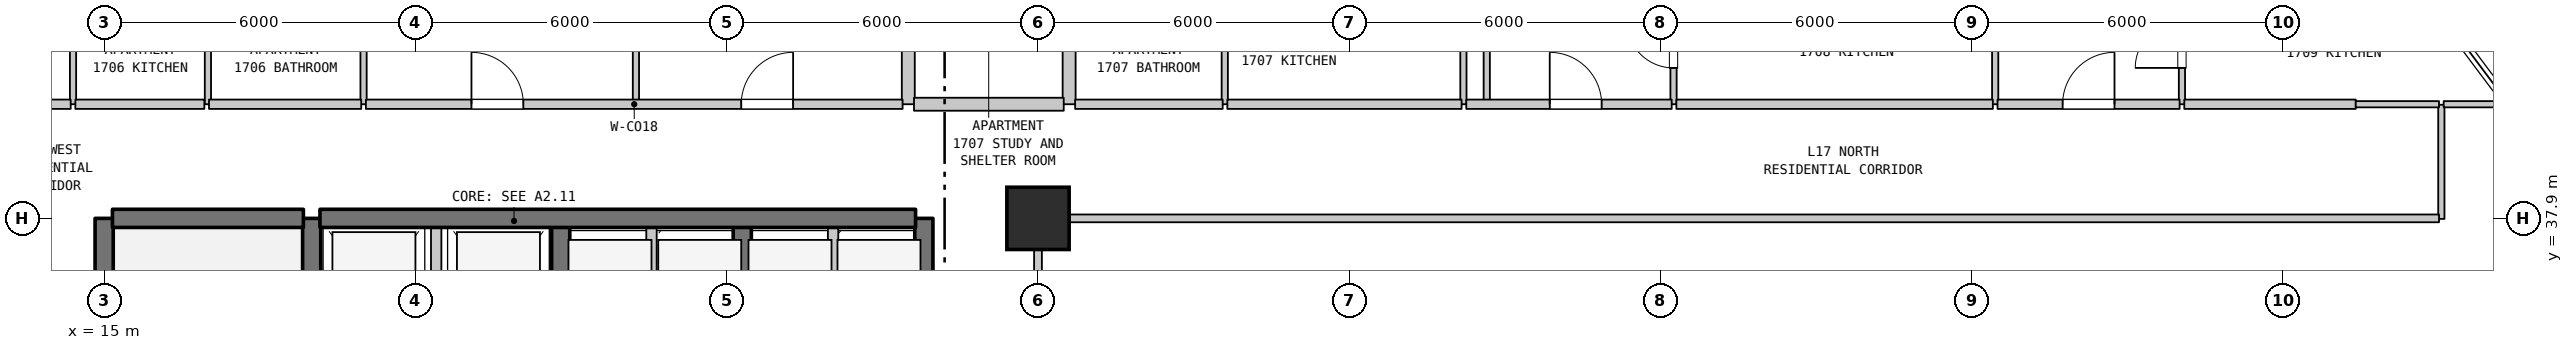
"""IFC4 building model, lengths in metres.
Left out: names, types, materials, properties, quantities, classifications, styles, units other than length and angle.
Written with IfcOpenShell. Run it as: python <this file> out.ifc"""

import sys

from ifc_helpers import new_model, si_unit, direction, frame, frame_2d, origin, origin_2d, place, context, subcontext, project, spatial, rectangle, extrude, element, fill, save


model = new_model("IFC4")
c1 = context("Model", 3, precision=1e-05, world=origin(), true_north=direction((0.0, 1.0)))
c2 = subcontext(c1, "Body", "Model", "MODEL_VIEW")
j1 = project(units=[si_unit("LENGTHUNIT", "METRE"), si_unit("PLANEANGLEUNIT", "RADIAN")], contexts=[c1])
p1 = place(None, origin())
s1 = spatial("IfcSite", under=j1, at=p1, CompositionType="ELEMENT")
p2 = place(p1, origin())
s2 = spatial("IfcBuilding", under=s1, at=p2, CompositionType="ELEMENT")
p3 = place(p2, frame((0.0, 0.0, 73.8)))
s3 = spatial("IfcBuildingStorey", under=s2, at=p3, CompositionType="ELEMENT", Elevation=73.8)
p4 = place(p3, frame((33.0, 37.9, 0.0), z_axis=(0.0, 0.0, 1.0), x_axis=(1.0, 0.0, 0.0)))
e1 = element("IfcColumn", 1, at=p4, inside=s3, PredefinedType="COLUMN", context=c2, shape_type="SweptSolid", body=[
    extrude(rectangle(XDim=1.2, YDim=1.2, at=origin_2d()), origin(), (0.0, 0.0, 1.0), 3.7),
])
p5 = place(p3, frame((14.4, 40.1, 0.0), z_axis=(0.0, 0.0, 1.0), x_axis=(0.0, 1.0, 0.0)))
e2 = element("IfcWall", 2, at=p5, inside=s3, PredefinedType="PARTITIONING", context=c2, shape_type="SweptSolid", body=[
    extrude(rectangle(XDim=2.3, YDim=0.12, at=frame_2d((1.15, 0.0))), origin(), (0.0, 0.0, 1.0), 3.385),
])
p6 = place(p3, frame((15.0, 31.1, 0.0), z_axis=(0.0, 0.0, 1.0), x_axis=(0.0, 1.0, 0.0)))
e3 = element("IfcWall", 3, at=p6, inside=s3, PredefinedType="SHEAR", context=c2, shape_type="SweptSolid", body=[
    extrude(rectangle(XDim=6.8, YDim=0.35, at=frame_2d((3.4, 0.0))), origin(), (0.0, 0.0, 1.0), 3.385),
])
p7 = place(p3, frame((17.0, 40.1, 0.0), z_axis=(0.0, 0.0, 1.0), x_axis=(0.0, 1.0, 0.0)))
e4 = element("IfcWall", 4, at=p7, inside=s3, PredefinedType="PARTITIONING", context=c2, shape_type="SweptSolid", body=[
    extrude(rectangle(XDim=2.3, YDim=0.12, at=frame_2d((1.15, 0.0))), origin(), (0.0, 0.0, 1.0), 3.385),
])
p8 = place(p3, frame((19.0, 35.0, 0.0), z_axis=(0.0, 0.0, 1.0), x_axis=(0.0, 1.0, 0.0)))
e5 = element("IfcWall", 5, at=p8, inside=s3, PredefinedType="SHEAR", context=c2, shape_type="SweptSolid", body=[
    extrude(rectangle(XDim=2.9, YDim=0.35, at=frame_2d((1.45, 0.0))), origin(), (0.0, 0.0, 1.0), 3.385),
])
p9 = place(p3, frame((20.0, 40.1, 0.0), z_axis=(0.0, 0.0, 1.0), x_axis=(0.0, 1.0, 0.0)))
e6 = element("IfcWall", 6, at=p9, inside=s3, PredefinedType="PARTITIONING", context=c2, shape_type="SweptSolid", body=[
    extrude(rectangle(XDim=2.3, YDim=0.12, at=frame_2d((1.15, 0.0))), origin(), (0.0, 0.0, 1.0), 3.385),
])
p10 = place(p3, frame((21.4, 35.0, 0.0), z_axis=(0.0, 0.0, 1.0), x_axis=(0.0, 1.0, 0.0)))
e7 = element("IfcWall", 7, at=p10, inside=s3, PredefinedType="STANDARD", context=c2, shape_type="SweptSolid", body=[
    extrude(rectangle(XDim=2.9, YDim=0.2, at=frame_2d((1.45, 0.0))), origin(), (0.0, 0.0, 1.0), 3.385),
])
p11 = place(p3, frame((23.8, 35.0, 0.0), z_axis=(0.0, 0.0, 1.0), x_axis=(0.0, 1.0, 0.0)))
e8 = element("IfcWall", 8, at=p11, inside=s3, PredefinedType="SHEAR", context=c2, shape_type="SweptSolid", body=[
    extrude(rectangle(XDim=2.9, YDim=0.35, at=frame_2d((1.45, 0.0))), origin(), (0.0, 0.0, 1.0), 3.385),
])
p12 = place(p3, frame((25.25, 40.1, 0.0), z_axis=(0.0, 0.0, 1.0), x_axis=(0.0, 1.0, 0.0)))
e9 = element("IfcWall", 9, at=p12, inside=s3, PredefinedType="PARTITIONING", context=c2, shape_type="SweptSolid", body=[
    extrude(rectangle(XDim=2.05, YDim=0.12, at=frame_2d((1.025, 0.0))), origin(), (0.0, 0.0, 1.0), 3.385),
])
p13 = place(p3, frame((25.55, 35.0, 0.0), z_axis=(0.0, 0.0, 1.0), x_axis=(0.0, 1.0, 0.0)))
e10 = element("IfcWall", 10, at=p13, inside=s3, PredefinedType="STANDARD", context=c2, shape_type="SweptSolid", body=[
    extrude(rectangle(XDim=2.9, YDim=0.2, at=frame_2d((1.45, 0.0))), origin(), (0.0, 0.0, 1.0), 3.385),
])
p14 = place(p3, frame((27.3, 35.0, 0.0), z_axis=(0.0, 0.0, 1.0), x_axis=(0.0, 1.0, 0.0)))
e11 = element("IfcWall", 11, at=p14, inside=s3, PredefinedType="SHEAR", context=c2, shape_type="SweptSolid", body=[
    extrude(rectangle(XDim=2.9, YDim=0.35, at=frame_2d((1.45, 0.0))), origin(), (0.0, 0.0, 1.0), 3.385),
])
p15 = place(p3, frame((29.05, 35.0, 0.0), z_axis=(0.0, 0.0, 1.0), x_axis=(0.0, 1.0, 0.0)))
e12 = element("IfcWall", 12, at=p15, inside=s3, PredefinedType="STANDARD", context=c2, shape_type="SweptSolid", body=[
    extrude(rectangle(XDim=2.9, YDim=0.2, at=frame_2d((1.45, 0.0))), origin(), (0.0, 0.0, 1.0), 3.385),
])
p16 = place(p3, frame((30.5, 40.1, 0.0), z_axis=(0.0, 0.0, 1.0), x_axis=(0.0, 1.0, 0.0)))
e13 = element("IfcWall", 13, at=p16, inside=s3, PredefinedType="STANDARD", context=c2, shape_type="SweptSolid", body=[
    extrude(rectangle(XDim=2.3, YDim=0.25, at=frame_2d((1.15, 0.0))), origin(), (0.0, 0.0, 1.0), 3.385),
])
p17 = place(p3, frame((30.8, 35.0, 0.0), z_axis=(0.0, 0.0, 1.0), x_axis=(0.0, 1.0, 0.0)))
e14 = element("IfcWall", 14, at=p17, inside=s3, PredefinedType="SHEAR", context=c2, shape_type="SweptSolid", body=[
    extrude(rectangle(XDim=2.9, YDim=0.35, at=frame_2d((1.45, 0.0))), origin(), (0.0, 0.0, 1.0), 3.385),
])
p18 = place(p3, frame((33.0, 27.91, 0.0), z_axis=(0.0, 0.0, 1.0), x_axis=(0.0, 1.0, 0.0)))
e15 = element("IfcWall", 15, at=p18, inside=s3, PredefinedType="STANDARD", context=c2, shape_type="SweptSolid", body=[
    extrude(rectangle(XDim=9.98, YDim=0.15, at=frame_2d((4.99, 0.0))), origin(), (0.0, 0.0, 1.0), 2.885),
])
p19 = place(p3, frame((33.6, 40.1, 0.0), z_axis=(0.0, 0.0, 1.0), x_axis=(0.0, 1.0, 0.0)))
e16 = element("IfcWall", 16, at=p19, inside=s3, PredefinedType="STANDARD", context=c2, shape_type="SweptSolid", body=[
    extrude(rectangle(XDim=2.3, YDim=0.25, at=frame_2d((1.15, 0.0))), origin(), (0.0, 0.0, 1.0), 3.385),
])
for number, where, z_axis, x_axis in (
    (17, (36.6, 40.1, 0.0), (0.0, 0.0, 1.0), (0.0, 1.0, 0.0)),
    (18, (41.2, 40.1, 0.0), (0.0, 0.0, 1.0), (0.0, 1.0, 0.0)),
):
    element("IfcWall", number, at=place(p3, frame(where, z_axis=z_axis, x_axis=x_axis)), inside=s3, PredefinedType="PARTITIONING", context=c2, shape_type="SweptSolid", body=[
        extrude(rectangle(XDim=2.3, YDim=0.12, at=frame_2d((1.15, 0.0))), origin(), (0.0, 0.0, 1.0), 3.385),
    ])
p20 = place(p3, frame((41.65, 40.1, 0.0), z_axis=(0.0, 0.0, 1.0), x_axis=(0.0, 1.0, 0.0)))
e19 = element("IfcWall", 19, at=p20, inside=s3, PredefinedType="PARTITIONING", context=c2, shape_type="SweptSolid", body=[
    extrude(rectangle(XDim=13.79, YDim=0.12, at=frame_2d((6.895, 0.0))), origin(), (0.0, 0.0, 1.0), 3.385),
])
p21 = place(p3, frame((45.25, 40.1, 0.0), z_axis=(0.0, 0.0, 1.0), x_axis=(0.0, 1.0, 0.0)))
e20 = element("IfcWall", 20, at=p21, inside=s3, PredefinedType="PARTITIONING", context=c2, shape_type="SweptSolid", body=[
    extrude(rectangle(XDim=2.3, YDim=0.12, at=frame_2d((1.15, 0.0))), origin(), (0.0, 0.0, 1.0), 3.385),
])
p22 = place(p21, frame((0.7, 0.0, 0.0)))
e21 = element("IfcOpeningElement", 21, at=p22, cuts=e20, PredefinedType="OPENING", context=c2, shape_type="SweptSolid", body=[
    extrude(rectangle(XDim=0.9, YDim=2.15, at=frame_2d((0.45, 1.075))), frame((0.0, 0.07, 0.0), z_axis=(0.0, -1.0, 0.0), x_axis=(1.0, 0.0, 0.0)), (0.0, 0.0, 1.0), 0.14),
])
p23 = place(p3, frame((51.45, 40.1, 0.0), z_axis=(0.0, 0.0, 1.0), x_axis=(0.0, 1.0, 0.0)))
e22 = element("IfcWall", 22, at=p23, inside=s3, PredefinedType="PARTITIONING", context=c2, shape_type="SweptSolid", body=[
    extrude(rectangle(XDim=2.3, YDim=0.12, at=frame_2d((1.15, 0.0))), origin(), (0.0, 0.0, 1.0), 3.385),
])
p24 = place(p3, frame((55.05, 40.1, 0.0), z_axis=(0.0, 0.0, 1.0), x_axis=(0.0, 1.0, 0.0)))
e23 = element("IfcWall", 23, at=p24, inside=s3, PredefinedType="PARTITIONING", context=c2, shape_type="SweptSolid", body=[
    extrude(rectangle(XDim=2.3, YDim=0.12, at=frame_2d((1.15, 0.0))), origin(), (0.0, 0.0, 1.0), 3.385),
])
p25 = place(p24, frame((0.7, 0.0, 0.0)))
e24 = element("IfcOpeningElement", 24, at=p25, cuts=e23, PredefinedType="OPENING", context=c2, shape_type="SweptSolid", body=[
    extrude(rectangle(XDim=0.9, YDim=2.15, at=frame_2d((0.45, 1.075))), frame((0.0, 0.07, 0.0), z_axis=(0.0, -1.0, 0.0), x_axis=(1.0, 0.0, 0.0)), (0.0, 0.0, 1.0), 0.14),
])
p26 = place(p3, frame((60.05, 37.89, 0.0), z_axis=(0.0, 0.0, 1.0), x_axis=(0.0, 1.0, 0.0)))
e25 = element("IfcWall", 25, at=p26, inside=s3, PredefinedType="PARTITIONING", context=c2, shape_type="SweptSolid", body=[
    extrude(rectangle(XDim=2.2, YDim=0.12, at=frame_2d((1.1, 0.0))), origin(), (0.0, 0.0, 1.0), 3.385),
])
p27 = place(p3, frame((15.16, 37.9, 0.0), z_axis=(0.0, 0.0, 1.0), x_axis=(1.0, 0.0, 0.0)))
e26 = element("IfcWall", 26, at=p27, inside=s3, PredefinedType="SHEAR", context=c2, shape_type="SweptSolid", body=[
    extrude(rectangle(XDim=3.68, YDim=0.35, at=frame_2d((1.84, 0.0))), origin(), (0.0, 0.0, 1.0), 3.385),
])
p28 = place(p3, frame((19.16, 37.9, 0.0), z_axis=(0.0, 0.0, 1.0), x_axis=(1.0, 0.0, 0.0)))
e27 = element("IfcWall", 27, at=p28, inside=s3, PredefinedType="SHEAR", context=c2, shape_type="SweptSolid", body=[
    extrude(rectangle(XDim=11.48, YDim=0.35, at=frame_2d((5.74, 0.0))), origin(), (0.0, 0.0, 1.0), 3.385),
])
p29 = place(p3, frame((33.07, 37.9, 0.0), z_axis=(0.0, 0.0, 1.0), x_axis=(1.0, 0.0, 0.0)))
e28 = element("IfcWall", 28, at=p29, inside=s3, PredefinedType="STANDARD", context=c2, shape_type="SweptSolid", body=[
    extrude(rectangle(XDim=26.935, YDim=0.15, at=frame_2d((13.467, 0.0))), origin(), (0.0, 0.0, 1.0), 3.385),
])
p30 = place(p3, frame((12.875, 40.1, 0.0), z_axis=(0.0, 0.0, 1.0), x_axis=(1.0, 0.0, 0.0)))
e29 = element("IfcWall", 29, at=p30, inside=s3, PredefinedType="STANDARD", context=c2, shape_type="SweptSolid", body=[
    extrude(rectangle(XDim=1.48, YDim=0.18, at=frame_2d((0.74, 0.0))), origin(), (0.0, 0.0, 1.0), 3.385),
])
p31 = place(p3, frame((14.445, 40.1, 0.0), z_axis=(0.0, 0.0, 1.0), x_axis=(1.0, 0.0, 0.0)))
e30 = element("IfcWall", 30, at=p31, inside=s3, PredefinedType="STANDARD", context=c2, shape_type="SweptSolid", body=[
    extrude(rectangle(XDim=2.486, YDim=0.18, at=frame_2d((1.243, 0.0))), origin(), (0.0, 0.0, 1.0), 3.385),
])
p32 = place(p3, frame((17.021, 40.1, 0.0), z_axis=(0.0, 0.0, 1.0), x_axis=(1.0, 0.0, 0.0)))
e31 = element("IfcWall", 31, at=p32, inside=s3, PredefinedType="STANDARD", context=c2, shape_type="SweptSolid", body=[
    extrude(rectangle(XDim=2.934, YDim=0.18, at=frame_2d((1.467, 0.0))), origin(), (0.0, 0.0, 1.0), 3.385),
])
p33 = place(p3, frame((20.045, 40.1, 0.0), z_axis=(0.0, 0.0, 1.0), x_axis=(1.0, 0.0, 0.0)))
e32 = element("IfcWall", 32, at=p33, inside=s3, PredefinedType="STANDARD", context=c2, shape_type="SweptSolid", body=[
    extrude(rectangle(XDim=10.345, YDim=0.18, at=frame_2d((5.172, 0.0))), origin(), (0.0, 0.0, 1.0), 3.385),
])
p34 = place(p33, frame((2.035, 0.0, 0.0)))
e33 = element("IfcOpeningElement", 33, at=p34, cuts=e32, PredefinedType="OPENING", context=c2, shape_type="SweptSolid", body=[
    extrude(rectangle(XDim=1.0, YDim=2.15, at=frame_2d((0.5, 1.075))), frame((0.0, 0.1, 0.0), z_axis=(0.0, -1.0, 0.0), x_axis=(1.0, 0.0, 0.0)), (0.0, 0.0, 1.0), 0.2),
])
p35 = place(p33, frame((7.235, 0.0, 0.0)))
e34 = element("IfcOpeningElement", 34, at=p35, cuts=e32, PredefinedType="OPENING", context=c2, shape_type="SweptSolid", body=[
    extrude(rectangle(XDim=1.0, YDim=2.15, at=frame_2d((0.5, 1.075))), frame((0.0, 0.1, 0.0), z_axis=(0.0, -1.0, 0.0), x_axis=(1.0, 0.0, 0.0)), (0.0, 0.0, 1.0), 0.2),
])
p36 = place(p3, frame((30.61, 40.1, 0.0), z_axis=(0.0, 0.0, 1.0), x_axis=(1.0, 0.0, 0.0)))
e35 = element("IfcWall", 35, at=p36, inside=s3, PredefinedType="STANDARD", context=c2, shape_type="SweptSolid", body=[
    extrude(rectangle(XDim=2.886, YDim=0.25, at=frame_2d((1.443, 0.0))), origin(), (0.0, 0.0, 1.0), 3.385),
])
p37 = place(p3, frame((33.716, 40.1, 0.0), z_axis=(0.0, 0.0, 1.0), x_axis=(1.0, 0.0, 0.0)))
e36 = element("IfcWall", 36, at=p37, inside=s3, PredefinedType="STANDARD", context=c2, shape_type="SweptSolid", body=[
    extrude(rectangle(XDim=2.844, YDim=0.18, at=frame_2d((1.422, 0.0))), origin(), (0.0, 0.0, 1.0), 3.385),
])
p38 = place(p3, frame((36.65, 40.1, 0.0), z_axis=(0.0, 0.0, 1.0), x_axis=(1.0, 0.0, 0.0)))
e37 = element("IfcWall", 37, at=p38, inside=s3, PredefinedType="STANDARD", context=c2, shape_type="SweptSolid", body=[
    extrude(rectangle(XDim=4.515, YDim=0.18, at=frame_2d((2.258, 0.0))), origin(), (0.0, 0.0, 1.0), 3.385),
])
p39 = place(p3, frame((41.255, 40.1, 0.0), z_axis=(0.0, 0.0, 1.0), x_axis=(1.0, 0.0, 0.0)))
e38 = element("IfcWall", 38, at=p39, inside=s3, PredefinedType="STANDARD", context=c2, shape_type="SweptSolid", body=[
    extrude(rectangle(XDim=3.96, YDim=0.18, at=frame_2d((1.98, 0.0))), origin(), (0.0, 0.0, 1.0), 3.385),
])
p40 = place(p39, frame((1.609, 0.0, 0.0)))
e39 = element("IfcOpeningElement", 39, at=p40, cuts=e38, PredefinedType="OPENING", context=c2, shape_type="SweptSolid", body=[
    extrude(rectangle(XDim=1.0, YDim=2.15, at=frame_2d((0.5, 1.075))), frame((0.0, 0.1, 0.0), z_axis=(0.0, -1.0, 0.0), x_axis=(1.0, 0.0, 0.0)), (0.0, 0.0, 1.0), 0.2),
])
p41 = place(p3, frame((45.305, 40.1, 0.0), z_axis=(0.0, 0.0, 1.0), x_axis=(1.0, 0.0, 0.0)))
e40 = element("IfcWall", 40, at=p41, inside=s3, PredefinedType="STANDARD", context=c2, shape_type="SweptSolid", body=[
    extrude(rectangle(XDim=6.1, YDim=0.18, at=frame_2d((3.05, 0.0))), origin(), (0.0, 0.0, 1.0), 3.385),
])
p42 = place(p3, frame((51.495, 40.1, 0.0), z_axis=(0.0, 0.0, 1.0), x_axis=(1.0, 0.0, 0.0)))
e41 = element("IfcWall", 41, at=p42, inside=s3, PredefinedType="STANDARD", context=c2, shape_type="SweptSolid", body=[
    extrude(rectangle(XDim=3.51, YDim=0.18, at=frame_2d((1.755, 0.0))), origin(), (0.0, 0.0, 1.0), 3.385),
])
p43 = place(p42, frame((1.255, 0.0, 0.0)))
e42 = element("IfcOpeningElement", 42, at=p43, cuts=e41, PredefinedType="OPENING", context=c2, shape_type="SweptSolid", body=[
    extrude(rectangle(XDim=1.0, YDim=2.15, at=frame_2d((0.5, 1.075))), frame((0.0, 0.1, 0.0), z_axis=(0.0, -1.0, 0.0), x_axis=(1.0, 0.0, 0.0)), (0.0, 0.0, 1.0), 0.2),
])
p44 = place(p3, frame((55.095, 40.1, 0.0), z_axis=(0.0, 0.0, 1.0), x_axis=(1.0, 0.0, 0.0)))
e43 = element("IfcWall", 43, at=p44, inside=s3, PredefinedType="STANDARD", context=c2, shape_type="SweptSolid", body=[
    extrude(rectangle(XDim=3.305, YDim=0.18, at=frame_2d((1.652, 0.0))), origin(), (0.0, 0.0, 1.0), 3.385),
])
p45 = place(p3, frame((58.4, 40.1, 0.0), z_axis=(0.0, 0.0, 1.0), x_axis=(1.0, 0.0, 0.0)))
e44 = element("IfcWall", 44, at=p45, inside=s3, PredefinedType="PARTITIONING", context=c2, shape_type="SweptSolid", body=[
    extrude(rectangle(XDim=1.605, YDim=0.12, at=frame_2d((0.802, 0.0))), origin(), (0.0, 0.0, 1.0), 3.385),
])
p46 = place(p3, frame((60.095, 40.1, 0.0), z_axis=(0.0, 0.0, 1.0), x_axis=(1.0, 0.0, 0.0)))
e45 = element("IfcWall", 45, at=p46, inside=s3, PredefinedType="PARTITIONING", context=c2, shape_type="SweptSolid", body=[
    extrude(rectangle(XDim=1.245, YDim=0.12, at=frame_2d((0.623, 0.0))), origin(), (0.0, 0.0, 1.0), 3.385),
])
p47 = place(p22, origin())
e46 = element("IfcDoor", 46, at=p47, inside=s3, OperationType="SINGLE_SWING_RIGHT", PredefinedType="DOOR", context=c2, shape_type="SweptSolid", body=[
    extrude(rectangle(XDim=0.9, YDim=2.15, at=frame_2d((0.45, 1.075))), frame((0.0, 0.025, 0.0), z_axis=(0.0, -1.0, 0.0), x_axis=(1.0, 0.0, 0.0)), (0.0, 0.0, 1.0), 0.05),
])
fill(e21, e46)
p48 = place(p25, origin())
e47 = element("IfcDoor", 47, at=p48, inside=s3, OperationType="SINGLE_SWING_LEFT", PredefinedType="DOOR", context=c2, shape_type="SweptSolid", body=[
    extrude(rectangle(XDim=0.9, YDim=2.15, at=frame_2d((0.45, 1.075))), frame((0.0, 0.025, 0.0), z_axis=(0.0, -1.0, 0.0), x_axis=(1.0, 0.0, 0.0)), (0.0, 0.0, 1.0), 0.05),
])
fill(e24, e47)
p49 = place(p34, origin())
e48 = element("IfcDoor", 48, at=p49, inside=s3, OperationType="SINGLE_SWING_LEFT", PredefinedType="DOOR", context=c2, shape_type="SweptSolid", body=[
    extrude(rectangle(XDim=1.0, YDim=2.15, at=frame_2d((0.5, 1.075))), frame((0.0, 0.025, 0.0), z_axis=(0.0, -1.0, 0.0), x_axis=(1.0, 0.0, 0.0)), (0.0, 0.0, 1.0), 0.05),
])
fill(e33, e48)
p50 = place(p35, origin())
e49 = element("IfcDoor", 49, at=p50, inside=s3, OperationType="SINGLE_SWING_RIGHT", PredefinedType="DOOR", context=c2, shape_type="SweptSolid", body=[
    extrude(rectangle(XDim=1.0, YDim=2.15, at=frame_2d((0.5, 1.075))), frame((0.0, 0.025, 0.0), z_axis=(0.0, -1.0, 0.0), x_axis=(1.0, 0.0, 0.0)), (0.0, 0.0, 1.0), 0.05),
])
fill(e34, e49)
p51 = place(p40, origin())
e50 = element("IfcDoor", 50, at=p51, inside=s3, OperationType="SINGLE_SWING_LEFT", PredefinedType="DOOR", context=c2, shape_type="SweptSolid", body=[
    extrude(rectangle(XDim=1.0, YDim=2.15, at=frame_2d((0.5, 1.075))), frame((0.0, 0.025, 0.0), z_axis=(0.0, -1.0, 0.0), x_axis=(1.0, 0.0, 0.0)), (0.0, 0.0, 1.0), 0.05),
])
fill(e39, e50)
p52 = place(p43, origin())
e51 = element("IfcDoor", 51, at=p52, inside=s3, OperationType="SINGLE_SWING_RIGHT", PredefinedType="DOOR", context=c2, shape_type="SweptSolid", body=[
    extrude(rectangle(XDim=1.0, YDim=2.15, at=frame_2d((0.5, 1.075))), frame((0.0, 0.025, 0.0), z_axis=(0.0, -1.0, 0.0), x_axis=(1.0, 0.0, 0.0)), (0.0, 0.0, 1.0), 0.05),
])
fill(e42, e51)
save(model, sys.argv[1])
